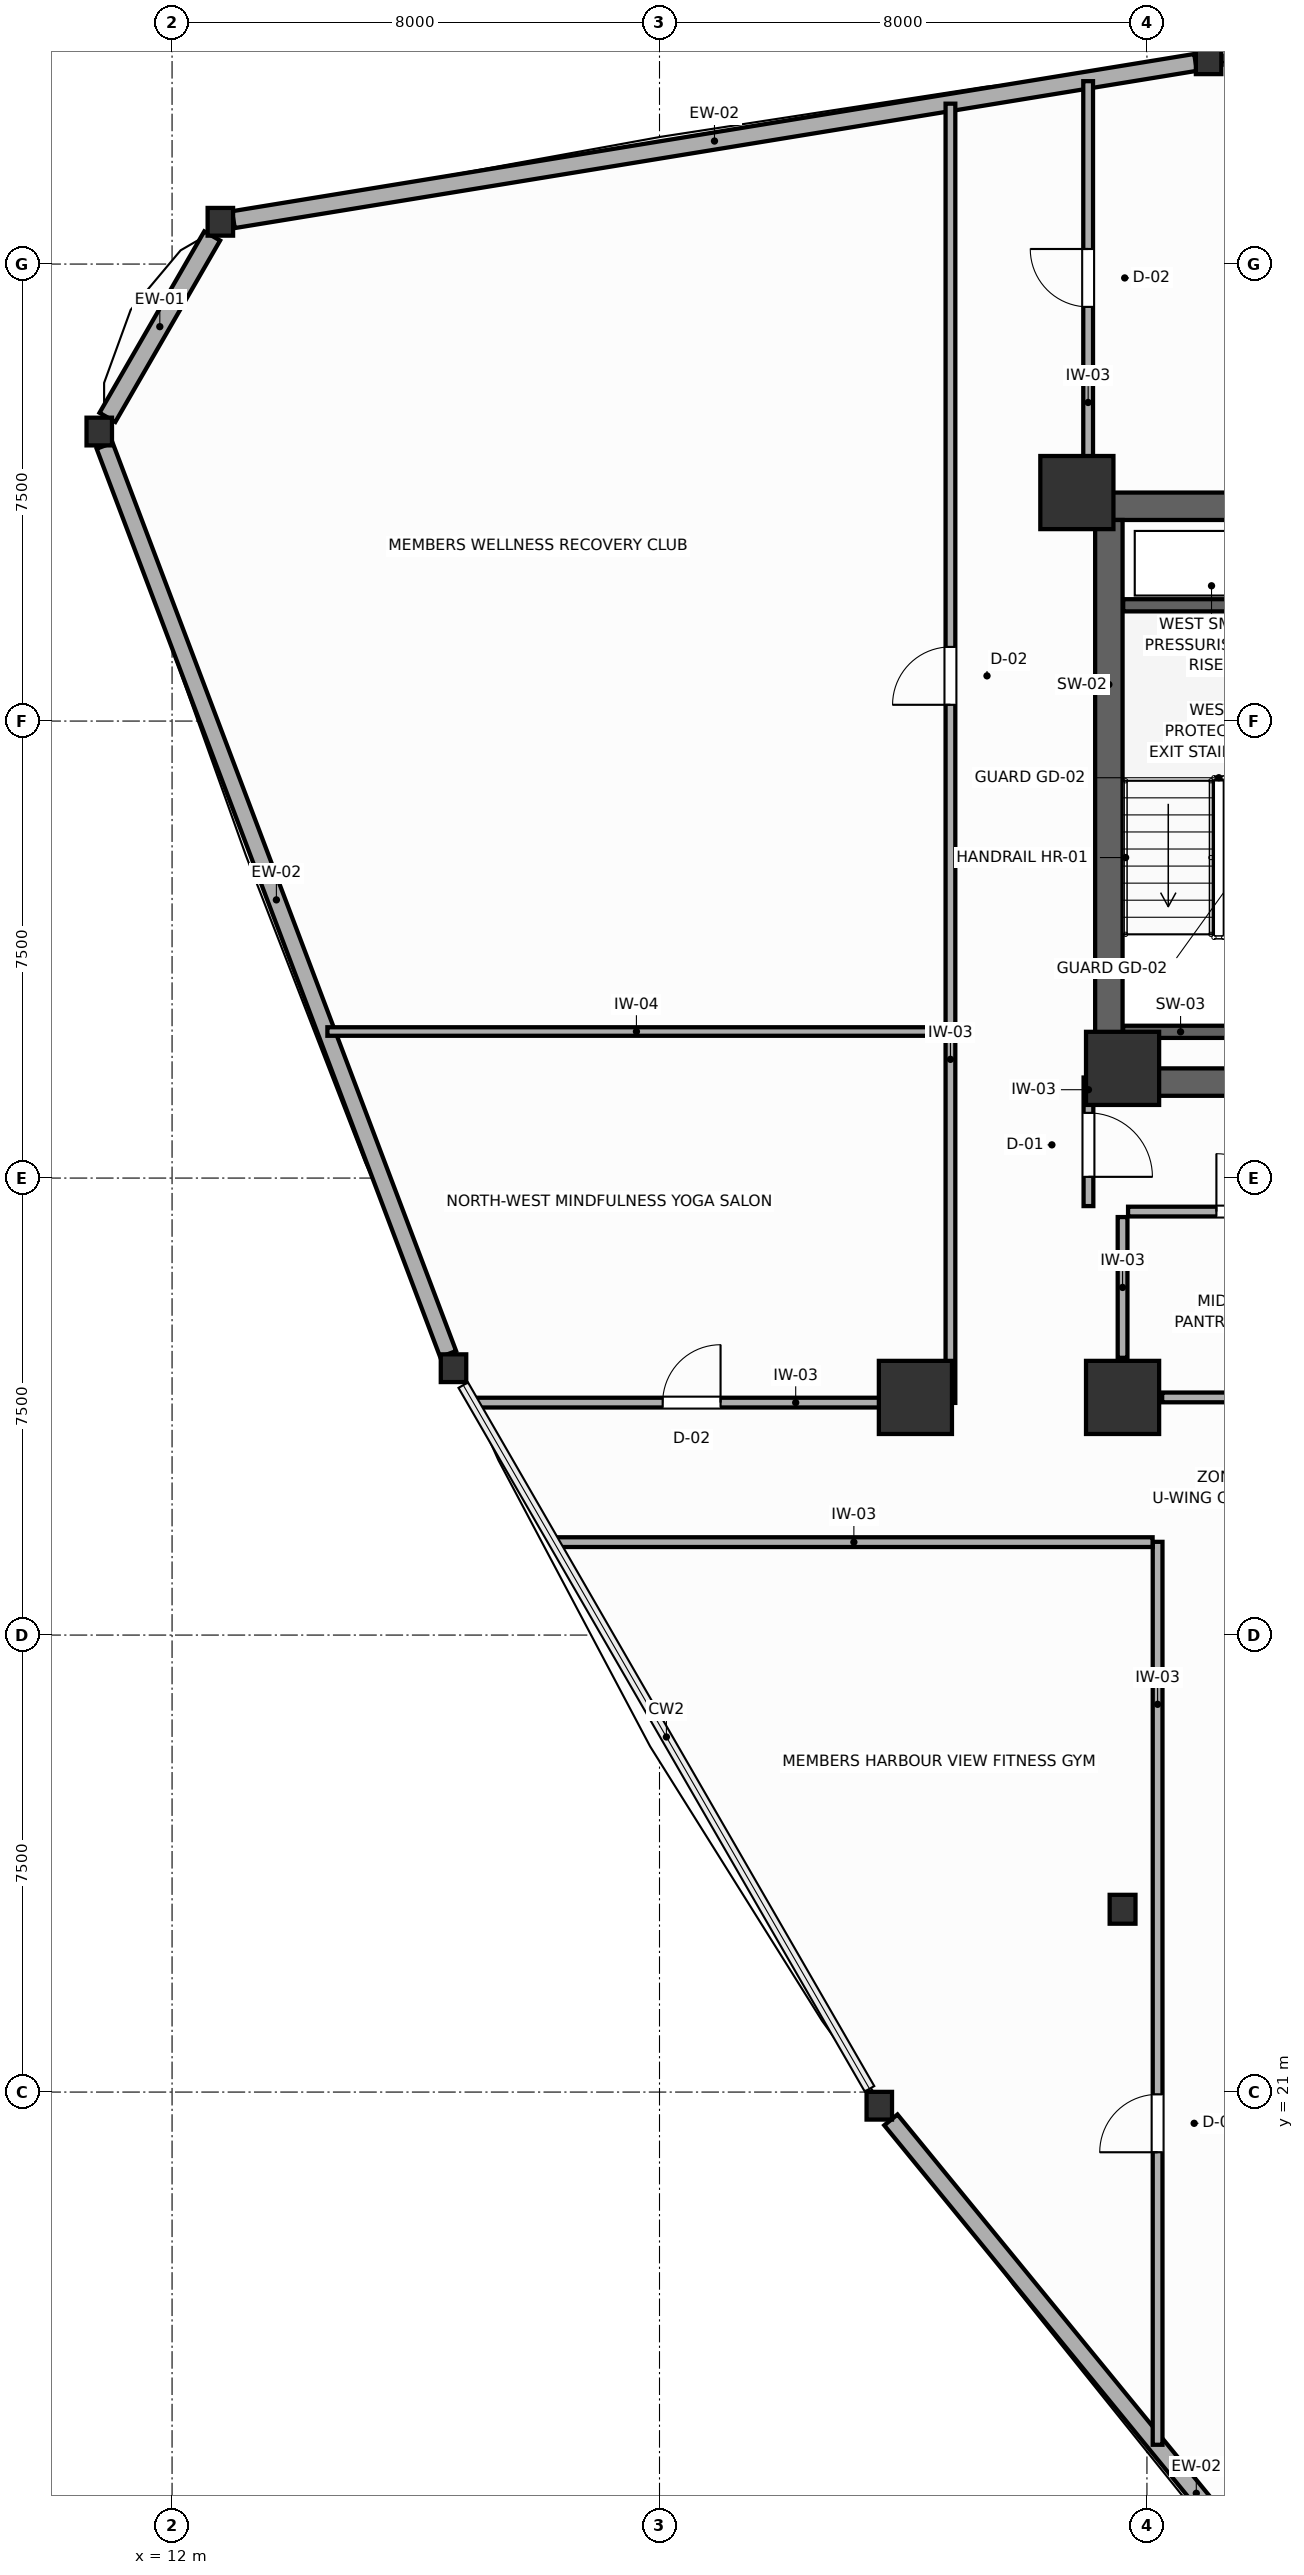
"""IFC4 building model, lengths in metres.
Left out: names, types, materials, properties, quantities, classifications, styles, units other than length and angle.
Written with IfcOpenShell. Run it as: python <this file> out.ifc"""

import sys

from ifc_helpers import new_model, si_unit, direction, frame, frame_2d, origin, origin_2d, place, context, subcontext, project, spatial, rectangle, i_section, extrude, source, transform, mapped, element, fill, save


model = new_model("IFC4")
c1 = context("Model", 3, precision=1e-05, world=origin(), true_north=direction((0.0, 1.0)))
c2 = subcontext(c1, "Body", "Model", "MODEL_VIEW")
j1 = project(units=[si_unit("LENGTHUNIT", "METRE"), si_unit("PLANEANGLEUNIT", "RADIAN")], contexts=[c1])
p1 = place(None, origin())
s1 = spatial("IfcSite", under=j1, at=p1, CompositionType="ELEMENT")
p2 = place(p1, origin())
s2 = spatial("IfcBuilding", under=s1, at=p2, CompositionType="ELEMENT")
p3 = place(p2, frame((0.0, 0.0, 117.0)))
s3 = spatial("IfcBuildingStorey", under=s2, at=p3, CompositionType="ELEMENT", Elevation=117.0)
p4 = place(p3, frame((27.15, 47.025, 0.0), z_axis=(0.0, 0.0, 1.0), x_axis=(1.0, 0.0, 0.0)))
e1 = element("IfcWall", 1, at=p4, inside=s3, PredefinedType="SHEAR", context=c2, shape_type="SweptSolid", body=[
    extrude(rectangle(XDim=17.7, YDim=0.45, at=frame_2d((8.85, 0.0))), origin(), (0.0, 0.0, 1.0), 3.6),
])
p5 = place(p3, frame((27.15, 37.575, 0.0), z_axis=(0.0, 0.0, 1.0), x_axis=(1.0, 0.0, 0.0)))
e2 = element("IfcWall", 2, at=p5, inside=s3, PredefinedType="SHEAR", context=c2, shape_type="SweptSolid", body=[
    extrude(rectangle(XDim=17.7, YDim=0.45, at=frame_2d((8.85, 0.0))), origin(), (0.0, 0.0, 1.0), 3.6),
])
p6 = place(p5, frame((4.875, 0.0, 0.0)))
e3 = element("IfcOpeningElement", 3, at=p6, cuts=e2, PredefinedType="OPENING", context=c2, shape_type="SweptSolid", body=[
    extrude(rectangle(XDim=1.05, YDim=2.1, at=frame_2d((0.525, 1.05))), frame((0.0, 0.235, 0.0), z_axis=(0.0, -1.0, 0.0), x_axis=(1.0, 0.0, 0.0)), (0.0, 0.0, 1.0), 0.47),
])
p7 = place(p5, frame((11.775, 0.0, 0.0)))
e4 = element("IfcOpeningElement", 4, at=p7, cuts=e2, PredefinedType="OPENING", context=c2, shape_type="SweptSolid", body=[
    extrude(rectangle(XDim=1.05, YDim=2.1, at=frame_2d((0.525, 1.05))), frame((0.0, 0.235, 0.0), z_axis=(0.0, -1.0, 0.0), x_axis=(1.0, 0.0, 0.0)), (0.0, 0.0, 1.0), 0.47),
])
p8 = place(p3, frame((27.375, 37.8, 0.0), z_axis=(0.0, 0.0, 1.0), x_axis=(0.0, 1.0, 0.0)))
e5 = element("IfcWall", 5, at=p8, inside=s3, PredefinedType="SHEAR", context=c2, shape_type="SweptSolid", body=[
    extrude(rectangle(XDim=9.0, YDim=0.45, at=frame_2d((4.5, 0.0))), origin(), (0.0, 0.0, 1.0), 3.6),
])
m1 = source(origin(), c2, "Body", "SweptSolid", [
    extrude(rectangle(XDim=1.2, YDim=1.2, at=origin_2d()), origin(), (0.0, 0.0, 1.0), 3.6),
])
for number, where, z_axis, x_axis in (
    (6, (26.85, 47.25, 0.0), (0.0, 0.0, 1.0), (1.0, 0.0, 0.0)),
    (7, (27.6, 37.8, 0.0), (0.0, 0.0, 1.0), (1.0, 0.0, 0.0)),
    (8, (27.6, 32.4, 0.0), (0.0, 0.0, 1.0), (1.0, 0.0, 0.0)),
    (9, (24.2, 32.4, 0.0), (0.0, 0.0, 1.0), (1.0, 0.0, 0.0)),
):
    element("IfcColumn", number, at=place(p3, frame(where, z_axis=z_axis, x_axis=x_axis)), inside=s3, PredefinedType="COLUMN", context=c2, shape_type="MappedRepresentation", body=[
        mapped(m1, transform((0.0, 0.0, 0.0), scale=1.0)),
    ])
m2 = source(origin(), c2, "Body", "SweptSolid", [
    extrude(i_section(OverallWidth=0.424, OverallDepth=0.474, WebThickness=0.045, FlangeThickness=0.072, FilletRadius=0.015, at=origin_2d()), origin(), (0.0, 0.0, 1.0), 3.6),
])
p9 = place(p3, frame((27.6, 24.0, 0.0), z_axis=(0.0, 0.0, 1.0), x_axis=(1.0, 0.0, 0.0)))
e10 = element("IfcColumn", 10, at=p9, inside=s3, PredefinedType="COLUMN", context=c2, shape_type="MappedRepresentation", body=[
    mapped(m2, transform((0.0, 0.0, 0.0), scale=1.0)),
])
m3 = source(origin(), c2, "Body", "SweptSolid", [
    extrude(i_section(OverallWidth=0.418, OverallDepth=0.455, WebThickness=0.039, FlangeThickness=0.063, FilletRadius=0.015, at=origin_2d()), origin(), (0.0, 0.0, 1.0), 3.6),
])
for number, where, z_axis, x_axis in (
    (11, (29.012, 54.344, 0.0), (0.0, 0.0, 1.0), (1.0, 0.0, 0.0)),
    (12, (12.792, 51.694, 0.0), (0.0, 0.0, 1.0), (1.0, 0.0, 0.0)),
    (13, (10.805, 48.251, 0.0), (0.0, 0.0, 1.0), (1.0, 0.0, 0.0)),
    (14, (16.619, 32.879, 0.0), (0.0, 0.0, 1.0), (1.0, 0.0, 0.0)),
    (15, (23.607, 20.776, 0.0), (0.0, 0.0, 1.0), (1.0, 0.0, 0.0)),
):
    element("IfcColumn", number, at=place(p3, frame(where, z_axis=z_axis, x_axis=x_axis)), inside=s3, PredefinedType="COLUMN", context=c2, shape_type="MappedRepresentation", body=[
        mapped(m3, transform((0.0, 0.0, 0.0), scale=1.0)),
    ])
p10 = place(p3, frame((28.798, 54.31, 0.0), z_axis=(0.0, 0.0, 1.0), x_axis=(-0.98690696995, -0.161290522546, 0.0)))
e16 = element("IfcWall", 16, at=p10, inside=s3, PredefinedType="SOLIDWALL", context=c2, shape_type="SweptSolid", body=[
    extrude(rectangle(XDim=16.001, YDim=0.28, at=frame_2d((8.0, 0.0))), origin(), (0.0, 0.0, 1.0), 1.87),
])
p11 = place(p3, frame((12.658, 51.461, 0.0), z_axis=(0.0, 0.0, 1.0), x_axis=(-0.500064626416, -0.86598808849, 0.0)))
e17 = element("IfcWall", 17, at=p11, inside=s3, PredefinedType="SOLIDWALL", context=c2, shape_type="SweptSolid", body=[
    extrude(rectangle(XDim=3.438, YDim=0.3, at=frame_2d((1.719, 0.0))), origin(), (0.0, 0.0, 1.0), 1.87),
])
p12 = place(p3, frame((10.893, 48.019, 0.0), z_axis=(0.0, 0.0, 1.0), x_axis=(0.353771130195, -0.935332019895, 0.0)))
e18 = element("IfcWall", 18, at=p12, inside=s3, PredefinedType="SOLIDWALL", context=c2, shape_type="SweptSolid", body=[
    extrude(rectangle(XDim=15.937, YDim=0.28, at=frame_2d((7.969, 0.0))), origin(), (0.0, 0.0, 1.0), 1.87),
])
p13 = place(p3, frame((23.797, 20.543, 0.0), z_axis=(0.0, 0.0, 1.0), x_axis=(0.633140387555, -0.774036982092, 0.0)))
e19 = element("IfcWall", 19, at=p13, inside=s3, PredefinedType="SOLIDWALL", context=c2, shape_type="SweptSolid", body=[
    extrude(rectangle(XDim=15.834, YDim=0.28, at=frame_2d((7.917, 0.0))), origin(), (0.0, 0.0, 1.0), 1.87),
])
for number, where, z_axis, x_axis in (
    (20, (27.61, 45.4, 0.0), (0.0, 0.0, 1.0), (1.0, 0.0, 0.0)),
    (21, (27.61, 38.4, 0.0), (0.0, 0.0, 1.0), (1.0, 0.0, 0.0)),
):
    element("IfcWall", number, at=place(p3, frame(where, z_axis=z_axis, x_axis=x_axis)), inside=s3, PredefinedType="SHEAR", context=c2, shape_type="SweptSolid", body=[
        extrude(rectangle(XDim=3.14, YDim=0.2, at=frame_2d((1.57, 0.0))), origin(), (0.0, 0.0, 1.0), 3.6),
    ])
p14 = place(p3, frame((28.25, 32.4, 0.0), z_axis=(0.0, 0.0, 1.0), x_axis=(1.0, 0.0, 0.0)))
e22 = element("IfcWall", 22, at=p14, inside=s3, PredefinedType="PARTITIONING", context=c2, shape_type="SweptSolid", body=[
    extrude(rectangle(XDim=3.45, YDim=0.16, at=frame_2d((1.725, 0.0))), origin(), (0.0, 0.0, 1.0), 2.16),
])
p15 = place(p3, frame((27.6, 33.05, 0.0), z_axis=(0.0, 0.0, 1.0), x_axis=(0.0, 1.0, 0.0)))
e23 = element("IfcWall", 23, at=p15, inside=s3, PredefinedType="PARTITIONING", context=c2, shape_type="SweptSolid", body=[
    extrude(rectangle(XDim=2.31, YDim=0.16, at=frame_2d((1.155, 0.0))), origin(), (0.0, 0.0, 1.0), 3.4),
])
p16 = place(p3, frame((27.69, 35.45, 0.0), z_axis=(0.0, 0.0, 1.0), x_axis=(1.0, 0.0, 0.0)))
e24 = element("IfcWall", 24, at=p16, inside=s3, PredefinedType="PARTITIONING", context=c2, shape_type="SweptSolid", body=[
    extrude(rectangle(XDim=4.01, YDim=0.16, at=frame_2d((2.005, 0.0))), origin(), (0.0, 0.0, 1.0), 3.4),
])
p17 = place(p16, frame((1.45, 0.0, 0.0)))
e25 = element("IfcOpeningElement", 25, at=p17, cuts=e24, PredefinedType="OPENING", context=c2, shape_type="SweptSolid", body=[
    extrude(rectangle(XDim=0.95, YDim=2.05, at=frame_2d((0.475, 1.025))), frame((0.0, 0.09, 0.0), z_axis=(0.0, -1.0, 0.0), x_axis=(1.0, 0.0, 0.0)), (0.0, 0.0, 1.0), 0.18),
])
p18 = place(p3, frame((27.04, 35.54, 0.0), z_axis=(0.0, 0.0, 1.0), x_axis=(0.0, 1.0, 0.0)))
e26 = element("IfcWall", 26, at=p18, inside=s3, PredefinedType="PARTITIONING", context=c2, shape_type="SweptSolid", body=[
    extrude(rectangle(XDim=2.11, YDim=0.16, at=frame_2d((1.055, 0.0))), origin(), (0.0, 0.0, 1.0), 3.4),
])
p19 = place(p18, frame((0.48, 0.0, 0.0)))
e27 = element("IfcOpeningElement", 27, at=p19, cuts=e26, PredefinedType="OPENING", context=c2, shape_type="SweptSolid", body=[
    extrude(rectangle(XDim=1.05, YDim=2.1, at=frame_2d((0.525, 1.05))), frame((0.0, 0.09, 0.0), z_axis=(0.0, -1.0, 0.0), x_axis=(1.0, 0.0, 0.0)), (0.0, 0.0, 1.0), 0.18),
])
p20 = place(p3, frame((24.775, 32.31, 0.0), z_axis=(0.0, 0.0, 1.0), x_axis=(0.0, 1.0, 0.0)))
e28 = element("IfcWall", 28, at=p20, inside=s3, PredefinedType="PARTITIONING", context=c2, shape_type="SweptSolid", body=[
    extrude(rectangle(XDim=21.322, YDim=0.16, at=frame_2d((10.661, 0.0))), origin(), (0.0, 0.0, 1.0), 3.4),
])
p21 = place(p20, frame((11.457, 0.0, 0.0)))
e29 = element("IfcOpeningElement", 29, at=p21, cuts=e28, PredefinedType="OPENING", context=c2, shape_type="SweptSolid", body=[
    extrude(rectangle(XDim=0.95, YDim=2.05, at=frame_2d((0.475, 1.025))), frame((0.0, 0.09, 0.0), z_axis=(0.0, -1.0, 0.0), x_axis=(1.0, 0.0, 0.0)), (0.0, 0.0, 1.0), 0.18),
])
p22 = place(p3, frame((28.175, 15.212, 0.0), z_axis=(0.0, 0.0, 1.0), x_axis=(0.0, 1.0, 0.0)))
e30 = element("IfcWall", 30, at=p22, inside=s3, PredefinedType="PARTITIONING", context=c2, shape_type="SweptSolid", body=[
    extrude(rectangle(XDim=14.818, YDim=0.16, at=frame_2d((7.409, 0.0))), origin(), (0.0, 0.0, 1.0), 3.4),
])
p23 = place(p22, frame((4.801, 0.0, 0.0)))
e31 = element("IfcOpeningElement", 31, at=p23, cuts=e30, PredefinedType="OPENING", context=c2, shape_type="SweptSolid", body=[
    extrude(rectangle(XDim=0.95, YDim=2.05, at=frame_2d((0.475, 1.025))), frame((0.0, 0.09, 0.0), z_axis=(0.0, -1.0, 0.0), x_axis=(1.0, 0.0, 0.0)), (0.0, 0.0, 1.0), 0.18),
])
p24 = place(p3, frame((18.287, 30.025, 0.0), z_axis=(0.0, 0.0, 1.0), x_axis=(1.0, 0.0, 0.0)))
e32 = element("IfcWall", 32, at=p24, inside=s3, PredefinedType="PARTITIONING", context=c2, shape_type="SweptSolid", body=[
    extrude(rectangle(XDim=9.806, YDim=0.16, at=frame_2d((4.903, 0.0))), origin(), (0.0, 0.0, 1.0), 3.4),
])
p25 = place(p3, frame((16.965, 32.315, 0.0), z_axis=(0.0, 0.0, 1.0), x_axis=(1.0, 0.0, 0.0)))
e33 = element("IfcWall", 33, at=p25, inside=s3, PredefinedType="PARTITIONING", context=c2, shape_type="SweptSolid", body=[
    extrude(rectangle(XDim=7.728, YDim=0.16, at=frame_2d((3.864, 0.0))), origin(), (0.0, 0.0, 1.0), 2.16),
])
p26 = place(p25, frame((3.087, 0.0, 0.0)))
e34 = element("IfcOpeningElement", 34, at=p26, cuts=e33, PredefinedType="OPENING", context=c2, shape_type="SweptSolid", body=[
    extrude(rectangle(XDim=0.95, YDim=2.05, at=frame_2d((0.475, 1.025))), frame((0.0, 0.09, 0.0), z_axis=(0.0, -1.0, 0.0), x_axis=(1.0, 0.0, 0.0)), (0.0, 0.0, 1.0), 0.18),
])
p27 = place(p3, frame((27.035, 47.34, 0.0), z_axis=(0.0, 0.0, 1.0), x_axis=(0.0, 1.0, 0.0)))
e35 = element("IfcWall", 35, at=p27, inside=s3, PredefinedType="PARTITIONING", context=c2, shape_type="SweptSolid", body=[
    extrude(rectangle(XDim=6.661, YDim=0.16, at=frame_2d((3.331, 0.0))), origin(), (0.0, 0.0, 1.0), 2.16),
])
p28 = place(p27, frame((2.957, 0.0, 0.0)))
e36 = element("IfcOpeningElement", 36, at=p28, cuts=e35, PredefinedType="OPENING", context=c2, shape_type="SweptSolid", body=[
    extrude(rectangle(XDim=0.95, YDim=2.05, at=frame_2d((0.475, 1.025))), frame((0.0, 0.09, 0.0), z_axis=(0.0, -1.0, 0.0), x_axis=(1.0, 0.0, 0.0)), (0.0, 0.0, 1.0), 0.18),
])
p29 = place(p3, frame((14.549, 38.405, 0.0), z_axis=(0.0, 0.0, 1.0), x_axis=(1.0, 0.0, 0.0)))
e37 = element("IfcWall", 37, at=p29, inside=s3, PredefinedType="PARTITIONING", context=c2, shape_type="SweptSolid", body=[
    extrude(rectangle(XDim=10.144, YDim=0.14, at=frame_2d((5.072, 0.0))), origin(), (0.0, 0.0, 1.0), 3.4),
])
p30 = place(p17, origin())
e38 = element("IfcDoor", 38, at=p30, inside=s3, OperationType="SINGLE_SWING_LEFT", PredefinedType="DOOR", context=c2, shape_type="SweptSolid", body=[
    extrude(rectangle(XDim=0.95, YDim=2.05, at=frame_2d((0.475, 1.025))), frame((0.0, 0.025, 0.0), z_axis=(0.0, -1.0, 0.0), x_axis=(1.0, 0.0, 0.0)), (0.0, 0.0, 1.0), 0.05),
])
fill(e25, e38)
p31 = place(p19, frame((1.05, 0.0, 0.0), z_axis=(0.0, 0.0, 1.0), x_axis=(-1.0, 0.0, 0.0)))
e39 = element("IfcDoor", 39, at=p31, inside=s3, OperationType="SINGLE_SWING_RIGHT", PredefinedType="DOOR", context=c2, shape_type="SweptSolid", body=[
    extrude(rectangle(XDim=1.05, YDim=2.1, at=frame_2d((0.525, 1.05))), frame((0.0, 0.025, 0.0), z_axis=(0.0, -1.0, 0.0), x_axis=(1.0, 0.0, 0.0)), (0.0, 0.0, 1.0), 0.05),
])
fill(e27, e39)
p32 = place(p21, origin())
e40 = element("IfcDoor", 40, at=p32, inside=s3, OperationType="SINGLE_SWING_LEFT", PredefinedType="DOOR", context=c2, shape_type="SweptSolid", body=[
    extrude(rectangle(XDim=0.95, YDim=2.05, at=frame_2d((0.475, 1.025))), frame((0.0, 0.025, 0.0), z_axis=(0.0, -1.0, 0.0), x_axis=(1.0, 0.0, 0.0)), (0.0, 0.0, 1.0), 0.05),
])
fill(e29, e40)
p33 = place(p23, origin())
e41 = element("IfcDoor", 41, at=p33, inside=s3, OperationType="SINGLE_SWING_LEFT", PredefinedType="DOOR", context=c2, shape_type="SweptSolid", body=[
    extrude(rectangle(XDim=0.95, YDim=2.05, at=frame_2d((0.475, 1.025))), frame((0.0, 0.025, 0.0), z_axis=(0.0, -1.0, 0.0), x_axis=(1.0, 0.0, 0.0)), (0.0, 0.0, 1.0), 0.05),
])
fill(e31, e41)
p34 = place(p26, origin())
e42 = element("IfcDoor", 42, at=p34, inside=s3, OperationType="SINGLE_SWING_RIGHT", PredefinedType="DOOR", context=c2, shape_type="SweptSolid", body=[
    extrude(rectangle(XDim=0.95, YDim=2.05, at=frame_2d((0.475, 1.025))), frame((0.0, 0.025, 0.0), z_axis=(0.0, -1.0, 0.0), x_axis=(1.0, 0.0, 0.0)), (0.0, 0.0, 1.0), 0.05),
])
fill(e34, e42)
p35 = place(p28, origin())
e43 = element("IfcDoor", 43, at=p35, inside=s3, OperationType="SINGLE_SWING_RIGHT", PredefinedType="DOOR", context=c2, shape_type="SweptSolid", body=[
    extrude(rectangle(XDim=0.95, YDim=2.05, at=frame_2d((0.475, 1.025))), frame((0.0, 0.025, 0.0), z_axis=(0.0, -1.0, 0.0), x_axis=(1.0, 0.0, 0.0)), (0.0, 0.0, 1.0), 0.05),
])
fill(e36, e43)
save(model, sys.argv[1])
